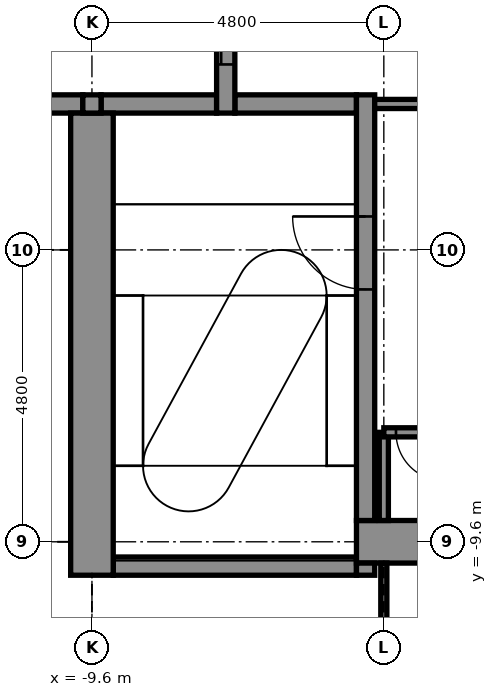
"""IFC4 building model, lengths in metres.
Left out: names, types, materials, properties, quantities, classifications, styles, units other than length and angle.
Written with IfcOpenShell. Run it as: python <this file> out.ifc"""

import sys

from ifc_helpers import new_model, si_unit, direction, frame, frame_2d, origin, place, context, subcontext, project, spatial, rectangle, extrude, element, fill, save


model = new_model("IFC4")
c1 = context("Model", 3, precision=1e-05, world=origin(), true_north=direction((0.0, 1.0)))
c2 = subcontext(c1, "Body", "Model", "MODEL_VIEW")
j1 = project(units=[si_unit("LENGTHUNIT", "METRE"), si_unit("PLANEANGLEUNIT", "RADIAN")], contexts=[c1])
p1 = place(None, origin())
s1 = spatial("IfcSite", under=j1, at=p1, CompositionType="ELEMENT")
p2 = place(p1, origin())
s2 = spatial("IfcBuilding", under=s1, at=p2, CompositionType="ELEMENT")
p3 = place(p2, frame((0.0, 0.0, 212.9)))
s3 = spatial("IfcBuildingStorey", under=s2, at=p3, CompositionType="ELEMENT", Elevation=212.9)
p4 = place(p3, frame((-9.25, -10.0, -0.15), z_axis=(0.0, 0.0, 1.0), x_axis=(1.0, 0.0, 0.0)))
e1 = element("IfcWall", 1, at=p4, inside=s3, PredefinedType="STANDARD", context=c2, shape_type="SweptSolid", body=[
    extrude(rectangle(XDim=4.0, YDim=0.3, at=frame_2d((2.0, 0.0))), origin(), (0.0, 0.0, 1.0), 3.75),
])
p5 = place(p3, frame((-5.25, -9.6, -0.15), z_axis=(0.0, 0.0, 1.0), x_axis=(1.0, 0.0, 0.0)))
e2 = element("IfcWall", 2, at=p5, inside=s3, PredefinedType="SHEAR", context=c2, shape_type="SweptSolid", body=[
    extrude(rectangle(XDim=10.2, YDim=0.7, at=frame_2d((5.1, 0.0))), origin(), (0.0, 0.0, 1.0), 3.75),
])
p6 = place(p5, frame((9.0, 0.0, 0.15)))
e3 = element("IfcOpeningElement", 3, at=p6, cuts=e2, PredefinedType="OPENING", context=c2, shape_type="SweptSolid", body=[
    extrude(rectangle(XDim=0.9, YDim=2.1, at=frame_2d((0.45, 1.05))), frame((0.0, 0.36, 0.0), z_axis=(0.0, -1.0, 0.0), x_axis=(1.0, 0.0, 0.0)), (0.0, 0.0, 1.0), 0.72),
])
p7 = place(p3, frame((-10.85, -2.4, -0.15), z_axis=(0.0, 0.0, 1.0), x_axis=(1.0, 0.0, 0.0)))
e4 = element("IfcWall", 4, at=p7, inside=s3, PredefinedType="STANDARD", context=c2, shape_type="SweptSolid", body=[
    extrude(rectangle(XDim=1.1, YDim=0.3, at=frame_2d((0.55, 0.0))), origin(), (0.0, 0.0, 1.0), 3.75),
])
p8 = place(p3, frame((-9.45, -2.4, -0.15), z_axis=(0.0, 0.0, 1.0), x_axis=(1.0, 0.0, 0.0)))
e5 = element("IfcWall", 5, at=p8, inside=s3, PredefinedType="STANDARD", context=c2, shape_type="SweptSolid", body=[
    extrude(rectangle(XDim=1.9, YDim=0.3, at=frame_2d((0.95, 0.0))), origin(), (0.0, 0.0, 1.0), 3.75),
])
p9 = place(p3, frame((-7.25, -2.4, -0.15), z_axis=(0.0, 0.0, 1.0), x_axis=(1.0, 0.0, 0.0)))
e6 = element("IfcWall", 6, at=p9, inside=s3, PredefinedType="STANDARD", context=c2, shape_type="SweptSolid", body=[
    extrude(rectangle(XDim=2.0, YDim=0.3, at=frame_2d((1.0, 0.0))), origin(), (0.0, 0.0, 1.0), 3.75),
])
p10 = place(p3, frame((-9.6, -10.15, -0.15), z_axis=(0.0, 0.0, 1.0), x_axis=(0.0, 1.0, 0.0)))
e7 = element("IfcWall", 7, at=p10, inside=s3, PredefinedType="SHEAR", context=c2, shape_type="SweptSolid", body=[
    extrude(rectangle(XDim=7.6, YDim=0.7, at=frame_2d((3.8, 0.0))), origin(), (0.0, 0.0, 1.0), 3.75),
])
p11 = place(p3, frame((-9.6, -2.55, -0.15), z_axis=(0.0, 0.0, 1.0), x_axis=(0.0, 1.0, 0.0)))
e8 = element("IfcWall", 8, at=p11, inside=s3, PredefinedType="STANDARD", context=c2, shape_type="SweptSolid", body=[
    extrude(rectangle(XDim=0.3, YDim=0.3, at=frame_2d((0.15, 0.0))), origin(), (0.0, 0.0, 1.0), 3.75),
])
p12 = place(p3, frame((-7.4, -2.55, -0.15), z_axis=(0.0, 0.0, 1.0), x_axis=(0.0, 1.0, 0.0)))
e9 = element("IfcWall", 9, at=p12, inside=s3, PredefinedType="STANDARD", context=c2, shape_type="SweptSolid", body=[
    extrude(rectangle(XDim=5.1, YDim=0.3, at=frame_2d((2.55, 0.0))), origin(), (0.0, 0.0, 1.0), 3.75),
])
p13 = place(p12, frame((0.8, 0.0, 0.15)))
e10 = element("IfcOpeningElement", 10, at=p13, cuts=e9, PredefinedType="OPENING", context=c2, shape_type="SweptSolid", body=[
    extrude(rectangle(XDim=1.1, YDim=2.1, at=frame_2d((0.55, 1.05))), frame((0.0, 0.16, 0.0), z_axis=(0.0, -1.0, 0.0), x_axis=(1.0, 0.0, 0.0)), (0.0, 0.0, 1.0), 0.32),
])
p14 = place(p12, frame((3.2, 0.0, 0.15)))
e11 = element("IfcOpeningElement", 11, at=p14, cuts=e9, PredefinedType="OPENING", context=c2, shape_type="SweptSolid", body=[
    extrude(rectangle(XDim=1.1, YDim=2.1, at=frame_2d((0.55, 1.05))), frame((0.0, 0.16, 0.0), z_axis=(0.0, -1.0, 0.0), x_axis=(1.0, 0.0, 0.0)), (0.0, 0.0, 1.0), 0.32),
])
p15 = place(p3, frame((-5.1, -10.15, -0.15), z_axis=(0.0, 0.0, 1.0), x_axis=(0.0, 1.0, 0.0)))
e12 = element("IfcWall", 12, at=p15, inside=s3, PredefinedType="STANDARD", context=c2, shape_type="SweptSolid", body=[
    extrude(rectangle(XDim=0.2, YDim=0.3, at=frame_2d((0.1, 0.0))), origin(), (0.0, 0.0, 1.0), 3.75),
])
p16 = place(p3, frame((-5.1, -9.25, -0.15), z_axis=(0.0, 0.0, 1.0), x_axis=(0.0, 1.0, 0.0)))
e13 = element("IfcWall", 13, at=p16, inside=s3, PredefinedType="STANDARD", context=c2, shape_type="SweptSolid", body=[
    extrude(rectangle(XDim=7.0, YDim=0.3, at=frame_2d((3.5, 0.0))), origin(), (0.0, 0.0, 1.0), 3.75),
])
p17 = place(p16, frame((3.8, 0.0, 0.15)))
e14 = element("IfcOpeningElement", 14, at=p17, cuts=e13, PredefinedType="OPENING", context=c2, shape_type="SweptSolid", body=[
    extrude(rectangle(XDim=1.2, YDim=2.1, at=frame_2d((0.6, 1.05))), frame((0.0, 0.16, 0.0), z_axis=(0.0, -1.0, 0.0), x_axis=(1.0, 0.0, 0.0)), (0.0, 0.0, 1.0), 0.32),
])
p18 = place(p3, frame((-4.8, -14.8, 0.0), z_axis=(0.0, 0.0, 1.0), x_axis=(0.0, 1.0, 0.0)))
e15 = element("IfcWall", 15, at=p18, inside=s3, PredefinedType="PARTITIONING", context=c2, shape_type="SweptSolid", body=[
    extrude(rectangle(XDim=4.85, YDim=0.1, at=frame_2d((2.425, 0.0))), origin(), (0.0, 0.0, 1.0), 2.838),
])
p19 = place(p3, frame((-4.8, -9.25, 0.0), z_axis=(0.0, 0.0, 1.0), x_axis=(0.0, 1.0, 0.0)))
e16 = element("IfcWall", 16, at=p19, inside=s3, PredefinedType="PARTITIONING", context=c2, shape_type="SweptSolid", body=[
    extrude(rectangle(XDim=1.45, YDim=0.15, at=frame_2d((0.725, 0.0))), origin(), (0.0, 0.0, 1.0), 3.6),
])
p20 = place(p3, frame((-4.8, -7.8, 0.0), z_axis=(0.0, 0.0, 1.0), x_axis=(1.0, 0.0, 0.0)))
e17 = element("IfcWall", 17, at=p20, inside=s3, PredefinedType="PARTITIONING", context=c2, shape_type="SweptSolid", body=[
    extrude(rectangle(XDim=1.05, YDim=0.15, at=frame_2d((0.525, 0.0))), origin(), (0.0, 0.0, 1.0), 3.6),
])
p21 = place(p20, frame((0.2, 0.0, 0.0)))
e18 = element("IfcOpeningElement", 18, at=p21, cuts=e17, PredefinedType="OPENING", context=c2, shape_type="SweptSolid", body=[
    extrude(rectangle(XDim=0.8, YDim=2.1, at=frame_2d((0.4, 1.05))), frame((0.0, 0.085, 0.0), z_axis=(0.0, -1.0, 0.0), x_axis=(1.0, 0.0, 0.0)), (0.0, 0.0, 1.0), 0.17),
])
p22 = place(p3, frame((-4.95, -2.4, 0.0), z_axis=(0.0, 0.0, 1.0), x_axis=(1.0, 0.0, 0.0)))
e19 = element("IfcWall", 19, at=p22, inside=s3, PredefinedType="PARTITIONING", context=c2, shape_type="SweptSolid", body=[
    extrude(rectangle(XDim=1.2, YDim=0.15, at=frame_2d((0.6, 0.0))), origin(), (0.0, 0.0, 1.0), 3.6),
])
p23 = place(p21, frame((0.8, 0.0, 0.0), z_axis=(0.0, 0.0, 1.0), x_axis=(-1.0, 0.0, 0.0)))
e20 = element("IfcDoor", 20, at=p23, inside=s3, OperationType="SINGLE_SWING_RIGHT", PredefinedType="DOOR", context=c2, shape_type="SweptSolid", body=[
    extrude(rectangle(XDim=0.8, YDim=2.1, at=frame_2d((0.4, 1.05))), frame((0.0, 0.025, 0.0), z_axis=(0.0, -1.0, 0.0), x_axis=(1.0, 0.0, 0.0)), (0.0, 0.0, 1.0), 0.05),
])
fill(e18, e20)
p24 = place(p13, origin())
e21 = element("IfcDoor", 21, at=p24, inside=s3, OperationType="DOUBLE_DOOR_SLIDING", PredefinedType="DOOR", context=c2, shape_type="SweptSolid", body=[
    extrude(rectangle(XDim=1.1, YDim=2.1, at=frame_2d((0.55, 1.05))), frame((0.0, 0.025, 0.0), z_axis=(0.0, -1.0, 0.0), x_axis=(1.0, 0.0, 0.0)), (0.0, 0.0, 1.0), 0.05),
])
fill(e10, e21)
p25 = place(p17, origin())
e22 = element("IfcDoor", 22, at=p25, inside=s3, OperationType="SINGLE_SWING_RIGHT", PredefinedType="DOOR", context=c2, shape_type="SweptSolid", body=[
    extrude(rectangle(XDim=1.2, YDim=2.1, at=frame_2d((0.6, 1.05))), frame((0.0, 0.025, 0.0), z_axis=(0.0, -1.0, 0.0), x_axis=(1.0, 0.0, 0.0)), (0.0, 0.0, 1.0), 0.05),
])
fill(e14, e22)
save(model, sys.argv[1])
